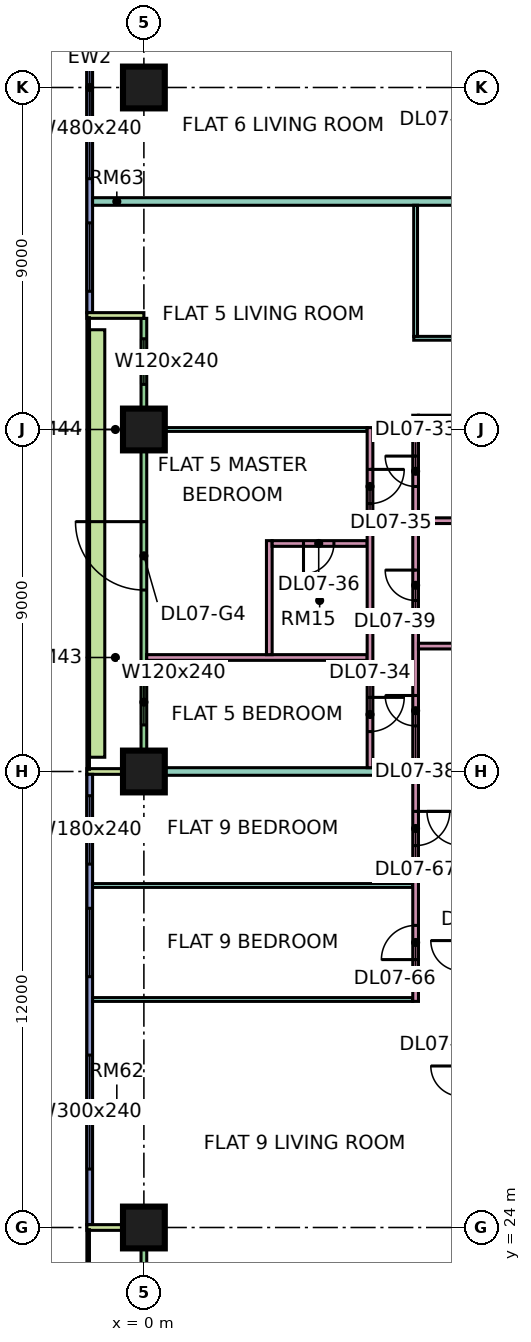
"""IFC4 building model, lengths in metres.
Left out: names, types, materials, properties, quantities, classifications, styles, units other than length and angle.
Written with IfcOpenShell. Run it as: python <this file> out.ifc"""

import sys

from ifc_helpers import new_model, si_unit, direction, frame, frame_2d, origin, origin_2d, place, context, subcontext, project, spatial, rectangle, extrude, element, fill, save


model = new_model("IFC4")
c1 = context("Model", 3, precision=1e-05, world=origin(), true_north=direction((0.0, 1.0)))
c2 = subcontext(c1, "Body", "Model", "MODEL_VIEW")
j1 = project(units=[si_unit("LENGTHUNIT", "METRE"), si_unit("PLANEANGLEUNIT", "RADIAN")], contexts=[c1])
p1 = place(None, origin())
s1 = spatial("IfcSite", under=j1, at=p1, CompositionType="ELEMENT")
p2 = place(p1, origin())
s2 = spatial("IfcBuilding", under=s1, at=p2, CompositionType="ELEMENT")
p3 = place(p2, frame((0.0, 0.0, 41.4)))
s3 = spatial("IfcBuildingStorey", under=s2, at=p3, CompositionType="ELEMENT", Elevation=41.4)
p4 = place(p3, frame((0.0, 24.0, 0.0), z_axis=(0.0, 0.0, 1.0), x_axis=(1.0, 0.0, 0.0)))
e1 = element("IfcColumn", 1, at=p4, inside=s3, PredefinedType="COLUMN", context=c2, shape_type="SweptSolid", body=[
    extrude(rectangle(XDim=1.1, YDim=1.1, at=origin_2d()), origin(), (0.0, 0.0, 1.0), 3.75),
])
p5 = place(p3, frame((0.0, 36.0, 0.0), z_axis=(0.0, 0.0, 1.0), x_axis=(1.0, 0.0, 0.0)))
e2 = element("IfcColumn", 2, at=p5, inside=s3, PredefinedType="COLUMN", context=c2, shape_type="SweptSolid", body=[
    extrude(rectangle(XDim=1.1, YDim=1.1, at=origin_2d()), origin(), (0.0, 0.0, 1.0), 3.75),
])
for number, where, z_axis, x_axis in (
    (3, (0.0, 45.0, 0.0), (0.0, 0.0, 1.0), (1.0, 0.0, 0.0)),
    (4, (0.0, 54.0, 0.0), (0.0, 0.0, 1.0), (1.0, 0.0, 0.0)),
):
    element("IfcColumn", number, at=place(p3, frame(where, z_axis=z_axis, x_axis=x_axis)), inside=s3, PredefinedType="COLUMN", context=c2, shape_type="SweptSolid", body=[
        extrude(rectangle(XDim=1.1, YDim=1.1, at=origin_2d()), origin(), (0.0, 0.0, 1.0), 3.75),
    ])
p6 = place(p3, frame((-1.425, 61.5, 0.0), z_axis=(0.0, 0.0, 1.0), x_axis=(0.0, -1.0, 0.0)))
e5 = element("IfcWall", 5, at=p6, inside=s3, PredefinedType="SOLIDWALL", context=c2, shape_type="SweptSolid", body=[
    extrude(rectangle(XDim=13.425, YDim=0.15, at=frame_2d((6.712, 0.0))), origin(), (0.0, 0.0, 1.0), 3.35),
])
p7 = place(p6, frame((0.3, 0.0, 0.45)))
e6 = element("IfcOpeningElement", 6, at=p7, cuts=e5, PredefinedType="OPENING", context=c2, shape_type="SweptSolid", body=[
    extrude(rectangle(XDim=0.9, YDim=2.4, at=frame_2d((0.45, 1.2))), frame((0.0, 0.085, 0.0), z_axis=(0.0, -1.0, 0.0), x_axis=(1.0, 0.0, 0.0)), (0.0, 0.0, 1.0), 0.17),
])
p8 = place(p6, frame((2.1, 0.0, 0.45)))
e7 = element("IfcOpeningElement", 7, at=p8, cuts=e5, PredefinedType="OPENING", context=c2, shape_type="SweptSolid", body=[
    extrude(rectangle(XDim=1.8, YDim=2.4, at=frame_2d((0.9, 1.2))), frame((0.0, 0.085, 0.0), z_axis=(0.0, -1.0, 0.0), x_axis=(1.0, 0.0, 0.0)), (0.0, 0.0, 1.0), 0.17),
])
p9 = place(p6, frame((5.1, 0.0, 0.45)))
e8 = element("IfcOpeningElement", 8, at=p9, cuts=e5, PredefinedType="OPENING", context=c2, shape_type="SweptSolid", body=[
    extrude(rectangle(XDim=4.8, YDim=2.4, at=frame_2d((2.4, 1.2))), frame((0.0, 0.085, 0.0), z_axis=(0.0, -1.0, 0.0), x_axis=(1.0, 0.0, 0.0)), (0.0, 0.0, 1.0), 0.17),
])
p10 = place(p6, frame((11.062, 0.0, 0.45)))
e9 = element("IfcOpeningElement", 9, at=p10, cuts=e5, PredefinedType="OPENING", context=c2, shape_type="SweptSolid", body=[
    extrude(rectangle(XDim=1.8, YDim=2.4, at=frame_2d((0.9, 1.2))), frame((0.0, 0.085, 0.0), z_axis=(0.0, -1.0, 0.0), x_axis=(1.0, 0.0, 0.0)), (0.0, 0.0, 1.0), 0.17),
])
p11 = place(p3, frame((0.0, 47.925, 0.0), z_axis=(0.0, 0.0, 1.0), x_axis=(0.0, -1.0, 0.0)))
e10 = element("IfcWall", 10, at=p11, inside=s3, PredefinedType="SOLIDWALL", context=c2, shape_type="SweptSolid", body=[
    extrude(rectangle(XDim=11.85, YDim=0.15, at=frame_2d((5.925, 0.0))), origin(), (0.0, 0.0, 1.0), 3.35),
])
p12 = place(p11, frame((0.538, 0.0, 0.45)))
e11 = element("IfcOpeningElement", 11, at=p12, cuts=e10, PredefinedType="OPENING", context=c2, shape_type="SweptSolid", body=[
    extrude(rectangle(XDim=1.2, YDim=2.4, at=frame_2d((0.6, 1.2))), frame((0.0, 0.085, 0.0), z_axis=(0.0, -1.0, 0.0), x_axis=(1.0, 0.0, 0.0)), (0.0, 0.0, 1.0), 0.17),
])
p13 = place(p11, frame((5.35, 0.0, 0.0)))
e12 = element("IfcOpeningElement", 12, at=p13, cuts=e10, PredefinedType="OPENING", context=c2, shape_type="SweptSolid", body=[
    extrude(rectangle(XDim=1.8, YDim=2.4, at=frame_2d((0.9, 1.2))), frame((0.0, 0.085, 0.0), z_axis=(0.0, -1.0, 0.0), x_axis=(1.0, 0.0, 0.0)), (0.0, 0.0, 1.0), 0.17),
])
p14 = place(p11, frame((9.5, 0.0, 0.45)))
e13 = element("IfcOpeningElement", 13, at=p14, cuts=e10, PredefinedType="OPENING", context=c2, shape_type="SweptSolid", body=[
    extrude(rectangle(XDim=1.2, YDim=2.4, at=frame_2d((0.6, 1.2))), frame((0.0, 0.085, 0.0), z_axis=(0.0, -1.0, 0.0), x_axis=(1.0, 0.0, 0.0)), (0.0, 0.0, 1.0), 0.17),
])
for number, where, z_axis, x_axis in (
    (14, (-1.5, 48.0, 0.0), (0.0, 0.0, 1.0), (1.0, 0.0, 0.0)),
    (15, (-1.5, 36.0, 0.0), (0.0, 0.0, 1.0), (1.0, 0.0, 0.0)),
):
    element("IfcWall", number, at=place(p3, frame(where, z_axis=z_axis, x_axis=x_axis)), inside=s3, PredefinedType="SOLIDWALL", context=c2, shape_type="SweptSolid", body=[
        extrude(rectangle(XDim=1.5, YDim=0.15, at=frame_2d((0.75, 0.0))), origin(), (0.0, 0.0, 1.0), 3.35),
    ])
p15 = place(p3, frame((-1.425, 35.925, 0.0), z_axis=(0.0, 0.0, 1.0), x_axis=(0.0, -1.0, 0.0)))
e16 = element("IfcWall", 16, at=p15, inside=s3, PredefinedType="SOLIDWALL", context=c2, shape_type="SweptSolid", body=[
    extrude(rectangle(XDim=11.85, YDim=0.15, at=frame_2d((5.925, 0.0))), origin(), (0.0, 0.0, 1.0), 3.35),
])
p16 = place(p15, frame((0.562, 0.0, 0.45)))
e17 = element("IfcOpeningElement", 17, at=p16, cuts=e16, PredefinedType="OPENING", context=c2, shape_type="SweptSolid", body=[
    extrude(rectangle(XDim=1.8, YDim=2.4, at=frame_2d((0.9, 1.2))), frame((0.0, 0.085, 0.0), z_axis=(0.0, -1.0, 0.0), x_axis=(1.0, 0.0, 0.0)), (0.0, 0.0, 1.0), 0.17),
])
p17 = place(p15, frame((3.525, 0.0, 0.45)))
e18 = element("IfcOpeningElement", 18, at=p17, cuts=e16, PredefinedType="OPENING", context=c2, shape_type="SweptSolid", body=[
    extrude(rectangle(XDim=1.8, YDim=2.4, at=frame_2d((0.9, 1.2))), frame((0.0, 0.085, 0.0), z_axis=(0.0, -1.0, 0.0), x_axis=(1.0, 0.0, 0.0)), (0.0, 0.0, 1.0), 0.17),
])
p18 = place(p15, frame((7.387, 0.0, 0.45)))
e19 = element("IfcOpeningElement", 19, at=p18, cuts=e16, PredefinedType="OPENING", context=c2, shape_type="SweptSolid", body=[
    extrude(rectangle(XDim=3.0, YDim=2.4, at=frame_2d((1.5, 1.2))), frame((0.0, 0.085, 0.0), z_axis=(0.0, -1.0, 0.0), x_axis=(1.0, 0.0, 0.0)), (0.0, 0.0, 1.0), 0.17),
])
p19 = place(p3, frame((0.0, 23.925, 0.0), z_axis=(0.0, 0.0, 1.0), x_axis=(0.0, -1.0, 0.0)))
e20 = element("IfcWall", 20, at=p19, inside=s3, PredefinedType="SOLIDWALL", context=c2, shape_type="SweptSolid", body=[
    extrude(rectangle(XDim=11.35, YDim=0.15, at=frame_2d((5.675, 0.0))), origin(), (0.0, 0.0, 1.0), 3.35),
])
p20 = place(p19, frame((6.738, 0.0, 0.0)))
e21 = element("IfcOpeningElement", 21, at=p20, cuts=e20, PredefinedType="OPENING", context=c2, shape_type="SweptSolid", body=[
    extrude(rectangle(XDim=1.8, YDim=2.4, at=frame_2d((0.9, 1.2))), frame((0.0, 0.085, 0.0), z_axis=(0.0, -1.0, 0.0), x_axis=(1.0, 0.0, 0.0)), (0.0, 0.0, 1.0), 0.17),
])
p21 = place(p3, frame((-1.5, 24.0, 0.0), z_axis=(0.0, 0.0, 1.0), x_axis=(1.0, 0.0, 0.0)))
e22 = element("IfcWall", 22, at=p21, inside=s3, PredefinedType="SOLIDWALL", context=c2, shape_type="SweptSolid", body=[
    extrude(rectangle(XDim=1.5, YDim=0.15, at=frame_2d((0.75, 0.0))), origin(), (0.0, 0.0, 1.0), 3.35),
])
p22 = place(p3, frame((-1.229, 47.625, 0.0), z_axis=(0.0, 0.0, 1.0), x_axis=(0.0, -1.0, 0.0)))
e23 = element("IfcWall", 23, at=p22, inside=s3, PredefinedType="SOLIDWALL", context=c2, shape_type="SweptSolid", body=[
    extrude(rectangle(XDim=11.25, YDim=0.4, at=frame_2d((5.625, 0.0))), origin(), (0.0, 0.0, 1.0), 0.7),
])
p23 = place(p3, frame((-1.351, 33.0, 0.0), z_axis=(0.0, 0.0, 1.0), x_axis=(1.0, 0.0, 0.0)))
e24 = element("IfcWall", 24, at=p23, inside=s3, PredefinedType="PARTITIONING", context=c2, shape_type="SweptSolid", body=[
    extrude(rectangle(XDim=8.426, YDim=0.1, at=frame_2d((4.213, 0.0))), origin(), (0.0, 0.0, 1.0), 3.35),
])
p24 = place(p3, frame((-1.35, 30.0, 0.0), z_axis=(0.0, 0.0, 1.0), x_axis=(1.0, 0.0, 0.0)))
e25 = element("IfcWall", 25, at=p24, inside=s3, PredefinedType="PARTITIONING", context=c2, shape_type="SweptSolid", body=[
    extrude(rectangle(XDim=8.425, YDim=0.1, at=frame_2d((4.212, 0.0))), origin(), (0.0, 0.0, 1.0), 3.35),
])
e26 = element("IfcWall", 26, at=p5, inside=s3, PredefinedType="PARTITIONING", context=c2, shape_type="SweptSolid", body=[
    extrude(rectangle(XDim=12.45, YDim=0.2, at=frame_2d((6.225, 0.0))), origin(), (0.0, 0.0, 1.0), 3.35),
])
p25 = place(p3, frame((-1.35, 51.0, 0.0), z_axis=(0.0, 0.0, 1.0), x_axis=(1.0, 0.0, 0.0)))
e27 = element("IfcWall", 27, at=p25, inside=s3, PredefinedType="PARTITIONING", context=c2, shape_type="SweptSolid", body=[
    extrude(rectangle(XDim=13.8, YDim=0.2, at=frame_2d((6.9, 0.0))), origin(), (0.0, 0.0, 1.0), 3.35),
])
p26 = place(p3, frame((0.074, 39.0, 0.0), z_axis=(0.0, 0.0, 1.0), x_axis=(1.0, 0.0, 0.0)))
e28 = element("IfcWall", 28, at=p26, inside=s3, PredefinedType="PARTITIONING", context=c2, shape_type="SweptSolid", body=[
    extrude(rectangle(XDim=5.801, YDim=0.15, at=frame_2d((2.9, 0.0))), origin(), (0.0, 0.0, 1.0), 3.35),
])
p27 = place(p3, frame((0.074, 45.0, 0.0), z_axis=(0.0, 0.0, 1.0), x_axis=(1.0, 0.0, 0.0)))
e29 = element("IfcWall", 29, at=p27, inside=s3, PredefinedType="PARTITIONING", context=c2, shape_type="SweptSolid", body=[
    extrude(rectangle(XDim=5.801, YDim=0.1, at=frame_2d((2.9, 0.0))), origin(), (0.0, 0.0, 1.0), 3.35),
])
p28 = place(p3, frame((3.3, 39.075, 0.0), z_axis=(0.0, 0.0, 1.0), x_axis=(0.0, 1.0, 0.0)))
e30 = element("IfcWall", 30, at=p28, inside=s3, PredefinedType="PARTITIONING", context=c2, shape_type="SweptSolid", body=[
    extrude(rectangle(XDim=3.0, YDim=0.15, at=frame_2d((1.5, 0.0))), origin(), (0.0, 0.0, 1.0), 3.35),
])
p29 = place(p3, frame((3.375, 42.0, 0.0), z_axis=(0.0, 0.0, 1.0), x_axis=(1.0, 0.0, 0.0)))
e31 = element("IfcWall", 31, at=p29, inside=s3, PredefinedType="PARTITIONING", context=c2, shape_type="SweptSolid", body=[
    extrude(rectangle(XDim=2.5, YDim=0.15, at=frame_2d((1.25, 0.0))), origin(), (0.0, 0.0, 1.0), 3.35),
])
p30 = place(p29, frame((0.825, 0.0, 0.0)))
e32 = element("IfcOpeningElement", 32, at=p30, cuts=e31, PredefinedType="OPENING", context=c2, shape_type="SweptSolid", body=[
    extrude(rectangle(XDim=0.8, YDim=2.1, at=frame_2d((0.4, 1.05))), frame((0.0, 0.085, 0.0), z_axis=(0.0, -1.0, 0.0), x_axis=(1.0, 0.0, 0.0)), (0.0, 0.0, 1.0), 0.17),
])
p31 = place(p3, frame((5.95, 36.1, 0.0), z_axis=(0.0, 0.0, 1.0), x_axis=(0.0, 1.0, 0.0)))
e33 = element("IfcWall", 33, at=p31, inside=s3, PredefinedType="PARTITIONING", context=c2, shape_type="SweptSolid", body=[
    extrude(rectangle(XDim=8.95, YDim=0.15, at=frame_2d((4.475, 0.0))), origin(), (0.0, 0.0, 1.0), 3.35),
])
p32 = place(p31, frame((0.95, 0.0, 0.0)))
e34 = element("IfcOpeningElement", 34, at=p32, cuts=e33, PredefinedType="OPENING", context=c2, shape_type="SweptSolid", body=[
    extrude(rectangle(XDim=0.9, YDim=2.1, at=frame_2d((0.45, 1.05))), frame((0.0, 0.085, 0.0), z_axis=(0.0, -1.0, 0.0), x_axis=(1.0, 0.0, 0.0)), (0.0, 0.0, 1.0), 0.17),
])
p33 = place(p31, frame((6.95, 0.0, 0.0)))
e35 = element("IfcOpeningElement", 35, at=p33, cuts=e33, PredefinedType="OPENING", context=c2, shape_type="SweptSolid", body=[
    extrude(rectangle(XDim=0.9, YDim=2.1, at=frame_2d((0.45, 1.05))), frame((0.0, 0.085, 0.0), z_axis=(0.0, -1.0, 0.0), x_axis=(1.0, 0.0, 0.0)), (0.0, 0.0, 1.0), 0.17),
])
p34 = place(p3, frame((7.1, 47.4, 0.0), z_axis=(0.0, 0.0, 1.0), x_axis=(1.0, 0.0, 0.0)))
e36 = element("IfcWall", 36, at=p34, inside=s3, PredefinedType="PARTITIONING", context=c2, shape_type="SweptSolid", body=[
    extrude(rectangle(XDim=5.35, YDim=0.1, at=frame_2d((2.675, 0.0))), origin(), (0.0, 0.0, 1.0), 3.35),
])
p35 = place(p34, frame((2.3, 0.0, 0.0)))
e37 = element("IfcOpeningElement", 37, at=p35, cuts=e36, PredefinedType="OPENING", context=c2, shape_type="SweptSolid", body=[
    extrude(rectangle(XDim=0.9, YDim=2.1, at=frame_2d((0.45, 1.05))), frame((0.0, 0.06, 0.0), z_axis=(0.0, -1.0, 0.0), x_axis=(1.0, 0.0, 0.0)), (0.0, 0.0, 1.0), 0.12),
])
p36 = place(p3, frame((7.15, 29.95, 0.0), z_axis=(0.0, 0.0, 1.0), x_axis=(0.0, 1.0, 0.0)))
e38 = element("IfcWall", 38, at=p36, inside=s3, PredefinedType="PARTITIONING", context=c2, shape_type="SweptSolid", body=[
    extrude(rectangle(XDim=5.95, YDim=0.15, at=frame_2d((2.975, 0.0))), origin(), (0.0, 0.0, 1.0), 3.35),
])
p37 = place(p36, frame((1.1, 0.0, 0.0)))
e39 = element("IfcOpeningElement", 39, at=p37, cuts=e38, PredefinedType="OPENING", context=c2, shape_type="SweptSolid", body=[
    extrude(rectangle(XDim=0.9, YDim=2.1, at=frame_2d((0.45, 1.05))), frame((0.0, 0.085, 0.0), z_axis=(0.0, -1.0, 0.0), x_axis=(1.0, 0.0, 0.0)), (0.0, 0.0, 1.0), 0.17),
])
p38 = place(p36, frame((4.1, 0.0, 0.0)))
e40 = element("IfcOpeningElement", 40, at=p38, cuts=e38, PredefinedType="OPENING", context=c2, shape_type="SweptSolid", body=[
    extrude(rectangle(XDim=0.9, YDim=2.1, at=frame_2d((0.45, 1.05))), frame((0.0, 0.085, 0.0), z_axis=(0.0, -1.0, 0.0), x_axis=(1.0, 0.0, 0.0)), (0.0, 0.0, 1.0), 0.17),
])
p39 = place(p3, frame((7.15, 36.1, 0.0), z_axis=(0.0, 0.0, 1.0), x_axis=(0.0, 1.0, 0.0)))
e41 = element("IfcWall", 41, at=p39, inside=s3, PredefinedType="PARTITIONING", context=c2, shape_type="SweptSolid", body=[
    extrude(rectangle(XDim=9.275, YDim=0.15, at=frame_2d((4.637, 0.0))), origin(), (0.0, 0.0, 1.0), 3.35),
])
p40 = place(p39, frame((7.4, 0.0, 0.0)))
e42 = element("IfcOpeningElement", 42, at=p40, cuts=e41, PredefinedType="OPENING", context=c2, shape_type="SweptSolid", body=[
    extrude(rectangle(XDim=0.8, YDim=2.1, at=frame_2d((0.4, 1.05))), frame((0.0, 0.085, 0.0), z_axis=(0.0, -1.0, 0.0), x_axis=(1.0, 0.0, 0.0)), (0.0, 0.0, 1.0), 0.17),
])
p41 = place(p39, frame((1.1, 0.0, 0.0)))
e43 = element("IfcOpeningElement", 43, at=p41, cuts=e41, PredefinedType="OPENING", context=c2, shape_type="SweptSolid", body=[
    extrude(rectangle(XDim=0.8, YDim=2.1, at=frame_2d((0.4, 1.05))), frame((0.0, 0.085, 0.0), z_axis=(0.0, -1.0, 0.0), x_axis=(1.0, 0.0, 0.0)), (0.0, 0.0, 1.0), 0.17),
])
p42 = place(p39, frame((4.4, 0.0, 0.0)))
e44 = element("IfcOpeningElement", 44, at=p42, cuts=e41, PredefinedType="OPENING", context=c2, shape_type="SweptSolid", body=[
    extrude(rectangle(XDim=0.8, YDim=2.1, at=frame_2d((0.4, 1.05))), frame((0.0, 0.085, 0.0), z_axis=(0.0, -1.0, 0.0), x_axis=(1.0, 0.0, 0.0)), (0.0, 0.0, 1.0), 0.17),
])
p43 = place(p3, frame((7.15, 47.45, 0.0), z_axis=(0.0, 0.0, 1.0), x_axis=(0.0, 1.0, 0.0)))
e45 = element("IfcWall", 45, at=p43, inside=s3, PredefinedType="PARTITIONING", context=c2, shape_type="SweptSolid", body=[
    extrude(rectangle(XDim=3.45, YDim=0.1, at=frame_2d((1.725, 0.0))), origin(), (0.0, 0.0, 1.0), 3.35),
])
for number, where, z_axis, x_axis in (
    (46, (7.225, 39.3, 0.0), (0.0, 0.0, 1.0), (1.0, 0.0, 0.0)),
    (47, (7.225, 42.6, 0.0), (0.0, 0.0, 1.0), (1.0, 0.0, 0.0)),
    (48, (7.225, 45.3, 0.0), (0.0, 0.0, 1.0), (1.0, 0.0, 0.0)),
):
    element("IfcWall", number, at=place(p3, frame(where, z_axis=z_axis, x_axis=x_axis)), inside=s3, PredefinedType="PARTITIONING", context=c2, shape_type="SweptSolid", body=[
        extrude(rectangle(XDim=5.225, YDim=0.15, at=frame_2d((2.612, 0.0))), origin(), (0.0, 0.0, 1.0), 3.35),
    ])
p44 = place(p9, origin())
e49 = element("IfcWindow", 49, at=p44, inside=s3, PartitioningType="SINGLE_PANEL", PredefinedType="WINDOW", context=c2, shape_type="SweptSolid", body=[
    extrude(rectangle(XDim=4.8, YDim=2.4, at=frame_2d((2.4, 1.2))), frame((0.0, 0.03, 0.0), z_axis=(0.0, -1.0, 0.0), x_axis=(1.0, 0.0, 0.0)), (0.0, 0.0, 1.0), 0.06),
])
fill(e8, e49)
p45 = place(p10, origin())
e50 = element("IfcWindow", 50, at=p45, inside=s3, PartitioningType="SINGLE_PANEL", PredefinedType="WINDOW", context=c2, shape_type="SweptSolid", body=[
    extrude(rectangle(XDim=1.8, YDim=2.4, at=frame_2d((0.9, 1.2))), frame((0.0, 0.03, 0.0), z_axis=(0.0, -1.0, 0.0), x_axis=(1.0, 0.0, 0.0)), (0.0, 0.0, 1.0), 0.06),
])
fill(e9, e50)
p46 = place(p12, origin())
e51 = element("IfcWindow", 51, at=p46, inside=s3, PartitioningType="SINGLE_PANEL", PredefinedType="WINDOW", context=c2, shape_type="SweptSolid", body=[
    extrude(rectangle(XDim=1.2, YDim=2.4, at=frame_2d((0.6, 1.2))), frame((0.0, 0.03, 0.0), z_axis=(0.0, -1.0, 0.0), x_axis=(1.0, 0.0, 0.0)), (0.0, 0.0, 1.0), 0.06),
])
fill(e11, e51)
p47 = place(p13, frame((1.8, 0.0, 0.0), z_axis=(0.0, 0.0, 1.0), x_axis=(-1.0, 0.0, 0.0)))
e52 = element("IfcDoor", 52, at=p47, inside=s3, OperationType="DOUBLE_DOOR_SINGLE_SWING", PredefinedType="DOOR", context=c2, shape_type="SweptSolid", body=[
    extrude(rectangle(XDim=1.8, YDim=2.4, at=frame_2d((0.9, 1.2))), frame((0.0, 0.025, 0.0), z_axis=(0.0, -1.0, 0.0), x_axis=(1.0, 0.0, 0.0)), (0.0, 0.0, 1.0), 0.05),
])
fill(e12, e52)
p48 = place(p14, origin())
e53 = element("IfcWindow", 53, at=p48, inside=s3, PartitioningType="SINGLE_PANEL", PredefinedType="WINDOW", context=c2, shape_type="SweptSolid", body=[
    extrude(rectangle(XDim=1.2, YDim=2.4, at=frame_2d((0.6, 1.2))), frame((0.0, 0.03, 0.0), z_axis=(0.0, -1.0, 0.0), x_axis=(1.0, 0.0, 0.0)), (0.0, 0.0, 1.0), 0.06),
])
fill(e13, e53)
p49 = place(p16, origin())
e54 = element("IfcWindow", 54, at=p49, inside=s3, PartitioningType="SINGLE_PANEL", PredefinedType="WINDOW", context=c2, shape_type="SweptSolid", body=[
    extrude(rectangle(XDim=1.8, YDim=2.4, at=frame_2d((0.9, 1.2))), frame((0.0, 0.03, 0.0), z_axis=(0.0, -1.0, 0.0), x_axis=(1.0, 0.0, 0.0)), (0.0, 0.0, 1.0), 0.06),
])
fill(e17, e54)
p50 = place(p17, origin())
e55 = element("IfcWindow", 55, at=p50, inside=s3, PartitioningType="SINGLE_PANEL", PredefinedType="WINDOW", context=c2, shape_type="SweptSolid", body=[
    extrude(rectangle(XDim=1.8, YDim=2.4, at=frame_2d((0.9, 1.2))), frame((0.0, 0.03, 0.0), z_axis=(0.0, -1.0, 0.0), x_axis=(1.0, 0.0, 0.0)), (0.0, 0.0, 1.0), 0.06),
])
fill(e18, e55)
p51 = place(p18, origin())
e56 = element("IfcWindow", 56, at=p51, inside=s3, PartitioningType="SINGLE_PANEL", PredefinedType="WINDOW", context=c2, shape_type="SweptSolid", body=[
    extrude(rectangle(XDim=3.0, YDim=2.4, at=frame_2d((1.5, 1.2))), frame((0.0, 0.03, 0.0), z_axis=(0.0, -1.0, 0.0), x_axis=(1.0, 0.0, 0.0)), (0.0, 0.0, 1.0), 0.06),
])
fill(e19, e56)
p52 = place(p40, frame((0.8, 0.0, 0.0), z_axis=(0.0, 0.0, 1.0), x_axis=(-1.0, 0.0, 0.0)))
e57 = element("IfcDoor", 57, at=p52, inside=s3, OperationType="SINGLE_SWING_RIGHT", PredefinedType="DOOR", context=c2, shape_type="SweptSolid", body=[
    extrude(rectangle(XDim=0.8, YDim=2.1, at=frame_2d((0.4, 1.05))), frame((0.0, 0.025, 0.0), z_axis=(0.0, -1.0, 0.0), x_axis=(1.0, 0.0, 0.0)), (0.0, 0.0, 1.0), 0.05),
])
fill(e42, e57)
p53 = place(p32, origin())
e58 = element("IfcDoor", 58, at=p53, inside=s3, OperationType="SINGLE_SWING_RIGHT", PredefinedType="DOOR", context=c2, shape_type="SweptSolid", body=[
    extrude(rectangle(XDim=0.9, YDim=2.1, at=frame_2d((0.45, 1.05))), frame((0.0, 0.025, 0.0), z_axis=(0.0, -1.0, 0.0), x_axis=(1.0, 0.0, 0.0)), (0.0, 0.0, 1.0), 0.05),
])
fill(e34, e58)
p54 = place(p33, origin())
e59 = element("IfcDoor", 59, at=p54, inside=s3, OperationType="SINGLE_SWING_RIGHT", PredefinedType="DOOR", context=c2, shape_type="SweptSolid", body=[
    extrude(rectangle(XDim=0.9, YDim=2.1, at=frame_2d((0.45, 1.05))), frame((0.0, 0.025, 0.0), z_axis=(0.0, -1.0, 0.0), x_axis=(1.0, 0.0, 0.0)), (0.0, 0.0, 1.0), 0.05),
])
fill(e35, e59)
p55 = place(p30, frame((0.8, 0.0, 0.0), z_axis=(0.0, 0.0, 1.0), x_axis=(-1.0, 0.0, 0.0)))
e60 = element("IfcDoor", 60, at=p55, inside=s3, OperationType="SINGLE_SWING_LEFT", PredefinedType="DOOR", context=c2, shape_type="SweptSolid", body=[
    extrude(rectangle(XDim=0.8, YDim=2.1, at=frame_2d((0.4, 1.05))), frame((0.0, 0.025, 0.0), z_axis=(0.0, -1.0, 0.0), x_axis=(1.0, 0.0, 0.0)), (0.0, 0.0, 1.0), 0.05),
])
fill(e32, e60)
p56 = place(p41, frame((0.8, 0.0, 0.0), z_axis=(0.0, 0.0, 1.0), x_axis=(-1.0, 0.0, 0.0)))
e61 = element("IfcDoor", 61, at=p56, inside=s3, OperationType="SINGLE_SWING_RIGHT", PredefinedType="DOOR", context=c2, shape_type="SweptSolid", body=[
    extrude(rectangle(XDim=0.8, YDim=2.1, at=frame_2d((0.4, 1.05))), frame((0.0, 0.025, 0.0), z_axis=(0.0, -1.0, 0.0), x_axis=(1.0, 0.0, 0.0)), (0.0, 0.0, 1.0), 0.05),
])
fill(e43, e61)
p57 = place(p42, frame((0.8, 0.0, 0.0), z_axis=(0.0, 0.0, 1.0), x_axis=(-1.0, 0.0, 0.0)))
e62 = element("IfcDoor", 62, at=p57, inside=s3, OperationType="SINGLE_SWING_RIGHT", PredefinedType="DOOR", context=c2, shape_type="SweptSolid", body=[
    extrude(rectangle(XDim=0.8, YDim=2.1, at=frame_2d((0.4, 1.05))), frame((0.0, 0.025, 0.0), z_axis=(0.0, -1.0, 0.0), x_axis=(1.0, 0.0, 0.0)), (0.0, 0.0, 1.0), 0.05),
])
fill(e44, e62)
p58 = place(p37, origin())
e63 = element("IfcDoor", 63, at=p58, inside=s3, OperationType="SINGLE_SWING_LEFT", PredefinedType="DOOR", context=c2, shape_type="SweptSolid", body=[
    extrude(rectangle(XDim=0.9, YDim=2.1, at=frame_2d((0.45, 1.05))), frame((0.0, 0.025, 0.0), z_axis=(0.0, -1.0, 0.0), x_axis=(1.0, 0.0, 0.0)), (0.0, 0.0, 1.0), 0.05),
])
fill(e39, e63)
p59 = place(p38, origin())
e64 = element("IfcDoor", 64, at=p59, inside=s3, OperationType="SINGLE_SWING_RIGHT", PredefinedType="DOOR", context=c2, shape_type="SweptSolid", body=[
    extrude(rectangle(XDim=0.9, YDim=2.1, at=frame_2d((0.45, 1.05))), frame((0.0, 0.025, 0.0), z_axis=(0.0, -1.0, 0.0), x_axis=(1.0, 0.0, 0.0)), (0.0, 0.0, 1.0), 0.05),
])
fill(e40, e64)
save(model, sys.argv[1])
